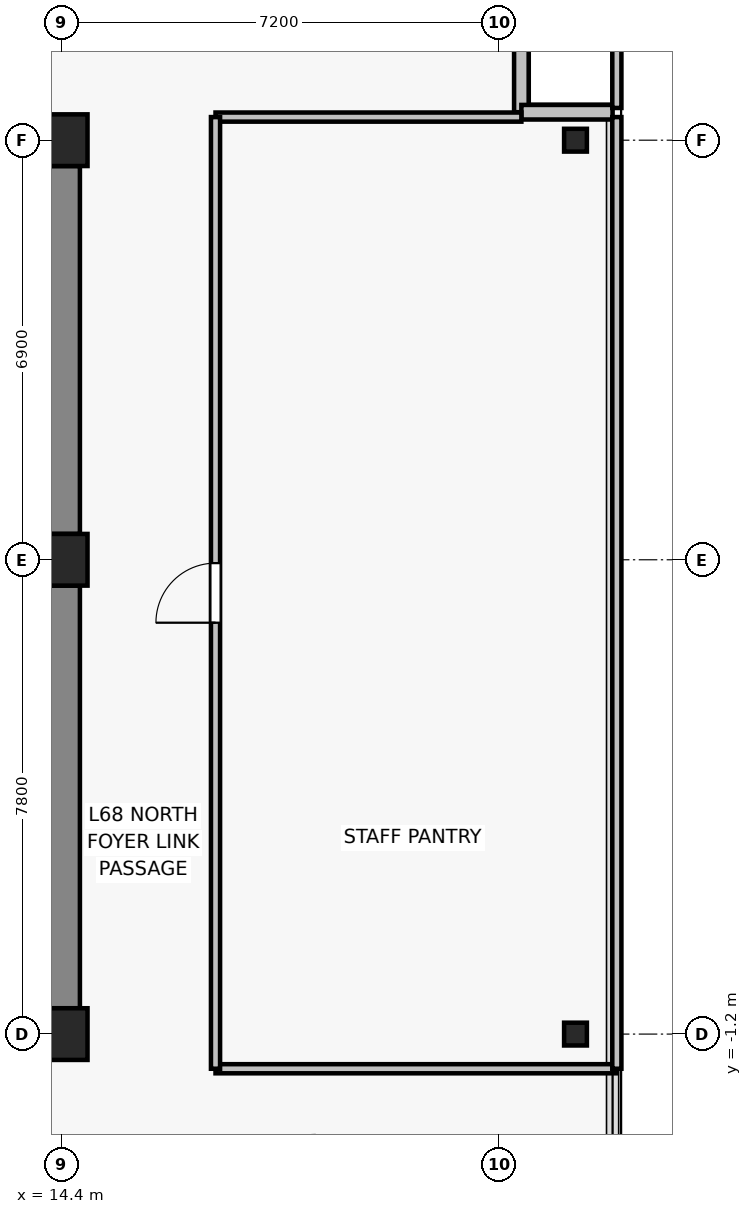
"""IFC4 building model, lengths in metres.
Left out: names, types, materials, properties, quantities, classifications, styles, units other than length and angle.
Written with IfcOpenShell. Run it as: python <this file> out.ifc"""

import sys

from ifc_helpers import new_model, si_unit, direction, frame, frame_2d, origin, origin_2d, place, context, subcontext, project, spatial, rectangle, i_section, extrude, source, transform, mapped, element, fill, save


model = new_model("IFC4")
c1 = context("Model", 3, precision=1e-05, world=origin(), true_north=direction((0.0, 1.0)))
c2 = subcontext(c1, "Body", "Model", "MODEL_VIEW")
j1 = project(units=[si_unit("LENGTHUNIT", "METRE"), si_unit("PLANEANGLEUNIT", "RADIAN")], contexts=[c1])
p1 = place(None, origin())
s1 = spatial("IfcSite", under=j1, at=p1, CompositionType="ELEMENT")
p2 = place(p1, origin())
s2 = spatial("IfcBuilding", under=s1, at=p2, CompositionType="ELEMENT")
p3 = place(p2, frame((0.0, 0.0, 241.9)))
s3 = spatial("IfcBuildingStorey", under=s2, at=p3, CompositionType="ELEMENT", Elevation=241.9)
for number, where, z_axis, x_axis in (
    (1, (14.4, -1.2, 0.0), (0.0, 0.0, 1.0), (1.0, 0.0, 0.0)),
    (2, (14.4, 6.6, 0.0), (0.0, 0.0, 1.0), (1.0, 0.0, 0.0)),
    (3, (14.4, 13.5, 0.0), (0.0, 0.0, 1.0), (1.0, 0.0, 0.0)),
):
    element("IfcColumn", number, at=place(p3, frame(where, z_axis=z_axis, x_axis=x_axis)), inside=s3, PredefinedType="COLUMN", context=c2, shape_type="SweptSolid", body=[
        extrude(rectangle(XDim=0.85, YDim=0.85, at=origin_2d()), origin(), (0.0, 0.0, 1.0), 3.3),
    ])
for number, where, z_axis, x_axis in (
    (4, (22.85, -1.2, 0.0), (0.0, 0.0, 1.0), (1.0, 0.0, 0.0)),
    (5, (22.85, 13.5, 0.0), (0.0, 0.0, 1.0), (1.0, 0.0, 0.0)),
):
    element("IfcColumn", number, at=place(p3, frame(where, z_axis=z_axis, x_axis=x_axis)), inside=s3, PredefinedType="COLUMN", context=c2, shape_type="SweptSolid", body=[
        extrude(i_section(OverallWidth=0.375, OverallDepth=0.375, WebThickness=0.017, FlangeThickness=0.027, FilletRadius=0.015, at=origin_2d()), origin(), (0.0, 0.0, 1.0), 3.3),
    ])
p4 = place(p3, frame((14.4, -0.775, 0.0), z_axis=(0.0, 0.0, 1.0), x_axis=(0.0, 1.0, 0.0)))
e6 = element("IfcWall", 6, at=p4, inside=s3, PredefinedType="SHEAR", context=c2, shape_type="SweptSolid", body=[
    extrude(rectangle(XDim=6.95, YDim=0.6, at=frame_2d((3.475, 0.0))), origin(), (0.0, 0.0, 1.0), 3.075),
])
p5 = place(p3, frame((14.4, 7.025, 0.0), z_axis=(0.0, 0.0, 1.0), x_axis=(0.0, 1.0, 0.0)))
e7 = element("IfcWall", 7, at=p5, inside=s3, PredefinedType="SHEAR", context=c2, shape_type="SweptSolid", body=[
    extrude(rectangle(XDim=6.05, YDim=0.6, at=frame_2d((3.025, 0.0))), origin(), (0.0, 0.0, 1.0), 3.075),
])
for number, where, z_axis, x_axis in (
    (8, (21.96, 13.96, 0.0), (0.0, 0.0, 1.0), (0.0, 1.0, 0.0)),
    (9, (23.46, 13.96, 0.0), (0.0, 0.0, 1.0), (-1.0, 0.0, 0.0)),
):
    element("IfcWall", number, at=place(p3, frame(where, z_axis=z_axis, x_axis=x_axis)), inside=s3, PredefinedType="SOLIDWALL", context=c2, shape_type="SweptSolid", body=[
        extrude(rectangle(XDim=1.5, YDim=0.24, at=frame_2d((0.75, 0.0))), origin(), (0.0, 0.0, 1.0), 3.075),
    ])
p6 = place(p3, frame((23.53, -1.77, 0.0), z_axis=(0.0, 0.0, 1.0), x_axis=(-1.0, 0.0, 0.0)))
e10 = element("IfcWall", 10, at=p6, inside=s3, PredefinedType="PARTITIONING", context=c2, shape_type="SweptSolid", body=[
    extrude(rectangle(XDim=6.6, YDim=0.15, at=frame_2d((3.3, 0.0))), origin(), (0.0, 0.0, 1.0), 2.765),
])
p7 = place(p3, frame((16.93, 13.88, 0.0), z_axis=(0.0, 0.0, 1.0), x_axis=(1.0, 0.0, 0.0)))
e11 = element("IfcWall", 11, at=p7, inside=s3, PredefinedType="PARTITIONING", context=c2, shape_type="SweptSolid", body=[
    extrude(rectangle(XDim=5.03, YDim=0.15, at=frame_2d((2.515, 0.0))), origin(), (0.0, 0.0, 1.0), 3.075),
])
p8 = place(p3, frame((16.93, -1.77, 0.0), z_axis=(0.0, 0.0, 1.0), x_axis=(0.0, 1.0, 0.0)))
e12 = element("IfcWall", 12, at=p8, inside=s3, PredefinedType="PARTITIONING", context=c2, shape_type="SweptSolid", body=[
    extrude(rectangle(XDim=15.65, YDim=0.15, at=frame_2d((7.825, 0.0))), origin(), (0.0, 0.0, 1.0), 2.615),
])
p9 = place(p8, frame((7.335, 0.0, 0.0)))
e13 = element("IfcOpeningElement", 13, at=p9, cuts=e12, PredefinedType="OPENING", context=c2, shape_type="SweptSolid", body=[
    extrude(rectangle(XDim=0.98, YDim=2.15, at=frame_2d((0.49, 1.075))), frame((0.0, 0.085, 0.0), z_axis=(0.0, -1.0, 0.0), x_axis=(1.0, 0.0, 0.0)), (0.0, 0.0, 1.0), 0.17),
])
p10 = place(p3, frame((23.53, 13.88, 0.0), z_axis=(0.0, 0.0, 1.0), x_axis=(0.0, -1.0, 0.0)))
e14 = element("IfcWall", 14, at=p10, inside=s3, PredefinedType="PARTITIONING", context=c2, shape_type="SweptSolid", body=[
    extrude(rectangle(XDim=15.65, YDim=0.15, at=frame_2d((7.825, 0.0))), origin(), (0.0, 0.0, 1.0), 3.075),
])
p11 = place(p3, frame((23.53, 17.03, 0.0), z_axis=(0.0, 0.0, 1.0), x_axis=(0.0, -1.0, 0.0)))
e15 = element("IfcWall", 15, at=p11, inside=s3, PredefinedType="PARTITIONING", context=c2, shape_type="SweptSolid", body=[
    extrude(rectangle(XDim=3.0, YDim=0.15, at=frame_2d((1.5, 0.0))), origin(), (0.0, 0.0, 1.0), 3.075),
])
m1 = source(origin(), c2, "Body", "SweptSolid", [
    extrude(rectangle(XDim=0.98, YDim=2.15, at=frame_2d((0.49, 1.075))), frame((0.0, 0.025, 0.0), z_axis=(0.0, -1.0, 0.0), x_axis=(1.0, 0.0, 0.0)), (0.0, 0.0, 1.0), 0.05),
])
p12 = place(p9, origin())
e16 = element("IfcDoor", 16, at=p12, inside=s3, OperationType="SINGLE_SWING_LEFT", PredefinedType="DOOR", context=c2, shape_type="MappedRepresentation", body=[
    mapped(m1, transform((0.0, 0.0, 0.0), x_axis=(1.0, 0.0, 0.0), y_axis=(0.0, 1.0, 0.0), z_axis=(0.0, 0.0, 1.0), scale=1.0)),
])
fill(e13, e16)
save(model, sys.argv[1])
